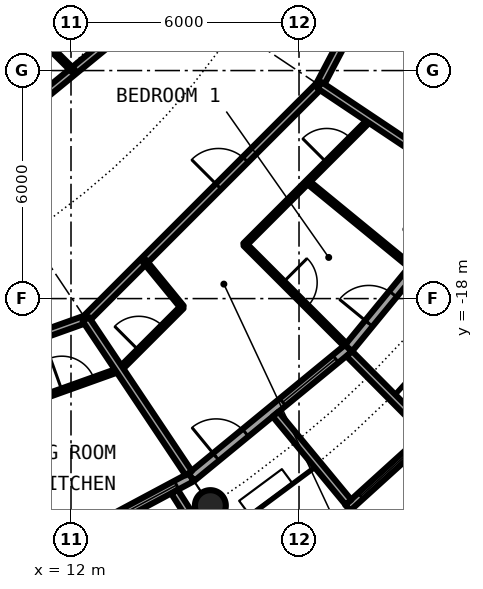
"""IFC4 building model, lengths in metres.
Left out: names, types, materials, properties, quantities, classifications, styles, units other than length and angle.
Written with IfcOpenShell. Run it as: python <this file> out.ifc"""

import sys

from ifc_helpers import new_model, si_unit, direction, frame, frame_2d, origin, origin_2d, place, context, subcontext, project, spatial, rectangle, circle, hollow_circle, extrude, element, fill, save


model = new_model("IFC4")
c1 = context("Model", 3, precision=1e-05, world=origin(), true_north=direction((0.0, 1.0)))
c2 = subcontext(c1, "Body", "Model", "MODEL_VIEW")
j1 = project(units=[si_unit("LENGTHUNIT", "METRE"), si_unit("PLANEANGLEUNIT", "RADIAN")], contexts=[c1])
p1 = place(None, origin())
s1 = spatial("IfcSite", under=j1, at=p1, CompositionType="ELEMENT")
p2 = place(p1, origin())
s2 = spatial("IfcBuilding", under=s1, at=p2, CompositionType="ELEMENT")
p3 = place(p2, frame((0.0, 0.0, 173.8)))
s3 = spatial("IfcBuildingStorey", under=s2, at=p3, CompositionType="ELEMENT", Elevation=173.8)
p4 = place(p3, frame((15.667, -23.448, 0.0), z_axis=(0.0, 0.0, 1.0), x_axis=(1.0, 0.0, 0.0)))
e1 = element("IfcColumn", 1, at=p4, inside=s3, PredefinedType="COLUMN", context=c2, shape_type="SweptSolid", body=[
    extrude(hollow_circle(Radius=0.406, WallThickness=0.04, at=origin_2d()), origin(), (0.0, 0.0, 1.0), 3.05),
])
p5 = place(p3, frame((10.447, -25.222, 0.0), z_axis=(0.0, 0.0, 1.0), x_axis=(0.881915646801, 0.471407246368, 0.0)))
e2 = element("IfcWall", 2, at=p5, inside=s3, PredefinedType="SOLIDWALL", context=c2, shape_type="SweptSolid", body=[
    extrude(rectangle(XDim=5.352, YDim=0.25, at=frame_2d((2.676, 0.0))), origin(), (0.0, 0.0, 1.0), 2.7),
])
p6 = place(p5, frame((0.841, 0.0, 0.0)))
e3 = element("IfcOpeningElement", 3, at=p6, cuts=e2, PredefinedType="OPENING", context=c2, shape_type="SweptSolid", body=[
    extrude(rectangle(XDim=1.0, YDim=2.2, at=frame_2d((0.5, 1.1))), frame((0.0, 0.135, 0.0), z_axis=(0.0, -1.0, 0.0), x_axis=(1.0, 0.0, 0.0)), (0.0, 0.0, 1.0), 0.27),
])
p7 = place(p5, frame((3.111, 0.0, 0.3)))
e4 = element("IfcOpeningElement", 4, at=p7, cuts=e2, PredefinedType="OPENING", context=c2, shape_type="SweptSolid", body=[
    extrude(rectangle(XDim=1.8, YDim=2.1, at=frame_2d((0.9, 1.05))), frame((0.0, 0.135, 0.0), z_axis=(0.0, -1.0, 0.0), x_axis=(1.0, 0.0, 0.0)), (0.0, 0.0, 1.0), 0.27),
])
p8 = place(p3, frame((14.722, -23.079, -0.03), z_axis=(0.0, 0.0, 1.0), x_axis=(0.537572179146, -0.843217737129, 0.0)))
e5 = element("IfcWall", 5, at=p8, inside=s3, PredefinedType="SOLIDWALL", context=c2, shape_type="SweptSolid", body=[
    extrude(rectangle(XDim=2.924, YDim=0.2, at=frame_2d((1.462, 0.0))), origin(), (0.0, 0.0, 1.0), 2.73),
])
p9 = place(p3, frame((15.167, -22.699, 0.0), z_axis=(0.0, 0.0, 1.0), x_axis=(0.773019449054, 0.634382322723, 0.0)))
e6 = element("IfcWall", 6, at=p9, inside=s3, PredefinedType="SOLIDWALL", context=c2, shape_type="SweptSolid", body=[
    extrude(rectangle(XDim=5.352, YDim=0.25, at=frame_2d((2.676, 0.0))), origin(), (0.0, 0.0, 1.0), 2.7),
])
p10 = place(p9, frame((0.841, 0.0, 0.0)))
e7 = element("IfcOpeningElement", 7, at=p10, cuts=e6, PredefinedType="OPENING", context=c2, shape_type="SweptSolid", body=[
    extrude(rectangle(XDim=1.0, YDim=2.2, at=frame_2d((0.5, 1.1))), frame((0.0, 0.135, 0.0), z_axis=(0.0, -1.0, 0.0), x_axis=(1.0, 0.0, 0.0)), (0.0, 0.0, 1.0), 0.27),
])
p11 = place(p9, frame((3.111, 0.0, 0.3)))
e8 = element("IfcOpeningElement", 8, at=p11, cuts=e6, PredefinedType="OPENING", context=c2, shape_type="SweptSolid", body=[
    extrude(rectangle(XDim=1.8, YDim=2.1, at=frame_2d((0.9, 1.05))), frame((0.0, 0.135, 0.0), z_axis=(0.0, -1.0, 0.0), x_axis=(1.0, 0.0, 0.0)), (0.0, 0.0, 1.0), 0.27),
])
p12 = place(p3, frame((19.282, -23.503, -0.03), z_axis=(0.0, 0.0, 1.0), x_axis=(0.740998365753, 0.671506829416, 0.0)))
e9 = element("IfcWall", 9, at=p12, inside=s3, PredefinedType="SOLIDWALL", context=c2, shape_type="SweptSolid", body=[
    extrude(rectangle(XDim=2.993, YDim=0.2, at=frame_2d((1.497, 0.0))), origin(), (0.0, 0.0, 1.0), 2.73),
])
p13 = place(p12, frame((0.457, 0.0, 0.33)))
e10 = element("IfcOpeningElement", 10, at=p13, cuts=e9, PredefinedType="OPENING", context=c2, shape_type="SweptSolid", body=[
    extrude(circle(Radius=1.04, at=frame_2d((1.04, 1.04))), frame((0.0, 0.11, 0.0), z_axis=(0.0, -1.0, 0.0), x_axis=(1.0, 0.0, 0.0)), (0.0, 0.0, 1.0), 0.22),
])
p14 = place(p3, frame((17.384, -21.041, -0.03), z_axis=(0.0, 0.0, 1.0), x_axis=(0.63709551667, -0.770784861449, 0.0)))
e11 = element("IfcWall", 11, at=p14, inside=s3, PredefinedType="SOLIDWALL", context=c2, shape_type="SweptSolid", body=[
    extrude(rectangle(XDim=3.006, YDim=0.2, at=frame_2d((1.503, 0.0))), origin(), (0.0, 0.0, 1.0), 2.73),
])
p15 = place(p3, frame((19.323, -19.45, -0.03), z_axis=(0.0, 0.0, 1.0), x_axis=(0.704476739375, -0.709727076896, 0.0)))
e12 = element("IfcWall", 12, at=p15, inside=s3, PredefinedType="SOLIDWALL", context=c2, shape_type="SweptSolid", body=[
    extrude(rectangle(XDim=2.883, YDim=0.2, at=frame_2d((1.441, 0.0))), origin(), (0.0, 0.0, 1.0), 2.73),
])
p16 = place(p3, frame((19.304, -19.304, 0.0), z_axis=(0.0, 0.0, 1.0), x_axis=(0.634382322723, 0.773019449054, 0.0)))
e13 = element("IfcWall", 13, at=p16, inside=s3, PredefinedType="SOLIDWALL", context=c2, shape_type="SweptSolid", body=[
    extrude(rectangle(XDim=5.352, YDim=0.25, at=frame_2d((2.676, 0.0))), origin(), (0.0, 0.0, 1.0), 2.7),
])
p17 = place(p16, frame((0.841, 0.0, 0.0)))
e14 = element("IfcOpeningElement", 14, at=p17, cuts=e13, PredefinedType="OPENING", context=c2, shape_type="SweptSolid", body=[
    extrude(rectangle(XDim=1.0, YDim=2.2, at=frame_2d((0.5, 1.1))), frame((0.0, 0.135, 0.0), z_axis=(0.0, -1.0, 0.0), x_axis=(1.0, 0.0, 0.0)), (0.0, 0.0, 1.0), 0.27),
])
p18 = place(p16, frame((3.111, 0.0, 0.3)))
e15 = element("IfcOpeningElement", 15, at=p18, cuts=e13, PredefinedType="OPENING", context=c2, shape_type="SweptSolid", body=[
    extrude(rectangle(XDim=1.8, YDim=2.1, at=frame_2d((0.9, 1.05))), frame((0.0, 0.135, 0.0), z_axis=(0.0, -1.0, 0.0), x_axis=(1.0, 0.0, 0.0)), (0.0, 0.0, 1.0), 0.27),
])
p19 = place(p3, frame((13.278, -19.872, 0.0), z_axis=(0.0, 0.0, 1.0), x_axis=(0.707316201218, 0.706897299114, 0.0)))
e16 = element("IfcWall", 16, at=p19, inside=s3, PredefinedType="PARTITIONING", context=c2, shape_type="SweptSolid", body=[
    extrude(rectangle(XDim=2.331, YDim=0.1, at=frame_2d((1.166, 0.0))), origin(), (0.0, 0.0, 1.0), 2.7),
])
p20 = place(p19, frame((0.716, 0.0, 0.0)))
e17 = element("IfcOpeningElement", 17, at=p20, cuts=e16, PredefinedType="OPENING", context=c2, shape_type="SweptSolid", body=[
    extrude(rectangle(XDim=0.9, YDim=2.3, at=frame_2d((0.45, 1.15))), frame((0.0, 0.06, 0.0), z_axis=(0.0, -1.0, 0.0), x_axis=(1.0, 0.0, 0.0)), (0.0, 0.0, 1.0), 0.12),
])
p21 = place(p3, frame((16.569, -16.583, 0.0), z_axis=(0.0, 0.0, 1.0), x_axis=(0.707316201218, 0.706897299114, 0.0)))
e18 = element("IfcWall", 18, at=p21, inside=s3, PredefinedType="PARTITIONING", context=c2, shape_type="SweptSolid", body=[
    extrude(rectangle(XDim=4.663, YDim=0.1, at=frame_2d((2.331, 0.0))), origin(), (0.0, 0.0, 1.0), 2.7),
])
p22 = place(p21, frame((3.055, 0.0, 0.0)))
e19 = element("IfcOpeningElement", 19, at=p22, cuts=e18, PredefinedType="OPENING", context=c2, shape_type="SweptSolid", body=[
    extrude(rectangle(XDim=0.9, YDim=2.3, at=frame_2d((0.45, 1.15))), frame((0.0, 0.06, 0.0), z_axis=(0.0, -1.0, 0.0), x_axis=(1.0, 0.0, 0.0)), (0.0, 0.0, 1.0), 0.12),
])
p23 = place(p3, frame((11.091, -20.655, 0.0), z_axis=(0.0, 0.0, 1.0), x_axis=(0.941484831917, 0.337055353422, 0.0)))
e20 = element("IfcWall", 20, at=p23, inside=s3, PredefinedType="PARTITIONING", context=c2, shape_type="SweptSolid", body=[
    extrude(rectangle(XDim=2.323, YDim=0.1, at=frame_2d((1.162, 0.0))), origin(), (0.0, 0.0, 1.0), 2.7),
])
p24 = place(p23, frame((0.711, 0.0, 0.0)))
e21 = element("IfcOpeningElement", 21, at=p24, cuts=e20, PredefinedType="OPENING", context=c2, shape_type="SweptSolid", body=[
    extrude(rectangle(XDim=0.9, YDim=2.3, at=frame_2d((0.45, 1.15))), frame((0.0, 0.06, 0.0), z_axis=(0.0, -1.0, 0.0), x_axis=(1.0, 0.0, 0.0)), (0.0, 0.0, 1.0), 0.12),
])
p25 = place(p3, frame((18.542, -12.389, 0.0), z_axis=(0.0, 0.0, 1.0), x_axis=(0.465605550524, 0.884992356646, 0.0)))
e22 = element("IfcWall", 22, at=p25, inside=s3, PredefinedType="PARTITIONING", context=c2, shape_type="SweptSolid", body=[
    extrude(rectangle(XDim=1.643, YDim=0.2, at=frame_2d((0.821, 0.0))), origin(), (0.0, 0.0, 1.0), 2.7),
])
p26 = place(p3, frame((12.389, -18.542, 0.0), z_axis=(0.0, 0.0, 1.0), x_axis=(0.707106781187, 0.707106781187, 0.0)))
e23 = element("IfcWall", 23, at=p26, inside=s3, PredefinedType="PARTITIONING", context=c2, shape_type="SweptSolid", body=[
    extrude(rectangle(XDim=8.702, YDim=0.2, at=frame_2d((4.351, 0.0))), origin(), (0.0, 0.0, 1.0), 2.7),
])
p27 = place(p26, frame((4.938, 0.0, 0.0)))
e24 = element("IfcOpeningElement", 24, at=p27, cuts=e23, PredefinedType="OPENING", context=c2, shape_type="SweptSolid", body=[
    extrude(rectangle(XDim=1.0, YDim=2.3, at=frame_2d((0.5, 1.15))), frame((0.0, 0.11, 0.0), z_axis=(0.0, -1.0, 0.0), x_axis=(1.0, 0.0, 0.0)), (0.0, 0.0, 1.0), 0.22),
])
p28 = place(p3, frame((2.186, -22.193, 0.0), z_axis=(0.0, 0.0, 1.0), x_axis=(0.941530192736, 0.336928621769, 0.0)))
e25 = element("IfcWall", 25, at=p28, inside=s3, PredefinedType="PARTITIONING", context=c2, shape_type="SweptSolid", body=[
    extrude(rectangle(XDim=10.836, YDim=0.2, at=frame_2d((5.418, 0.0))), origin(), (0.0, 0.0, 1.0), 2.7),
])
p29 = place(p28, frame((3.835, 0.0, 0.0)))
e26 = element("IfcOpeningElement", 26, at=p29, cuts=e25, PredefinedType="OPENING", context=c2, shape_type="SweptSolid", body=[
    extrude(rectangle(XDim=1.0, YDim=2.3, at=frame_2d((0.5, 1.15))), frame((0.0, 0.11, 0.0), z_axis=(0.0, -1.0, 0.0), x_axis=(1.0, 0.0, 0.0)), (0.0, 0.0, 1.0), 0.22),
])
p30 = place(p3, frame((6.773, -16.353, 0.0), z_axis=(0.0, 0.0, 1.0), x_axis=(0.773034536097, 0.634363938131, 0.0)))
e27 = element("IfcWall", 27, at=p30, inside=s3, PredefinedType="PARTITIONING", context=c2, shape_type="SweptSolid", body=[
    extrude(rectangle(XDim=10.277, YDim=0.2, at=frame_2d((5.138, 0.0))), origin(), (0.0, 0.0, 1.0), 2.7),
])
p31 = place(p30, frame((4.638, 0.0, 0.0)))
e28 = element("IfcOpeningElement", 28, at=p31, cuts=e27, PredefinedType="OPENING", context=c2, shape_type="SweptSolid", body=[
    extrude(rectangle(XDim=1.0, YDim=2.3, at=frame_2d((0.5, 1.15))), frame((0.0, 0.11, 0.0), z_axis=(0.0, -1.0, 0.0), x_axis=(1.0, 0.0, 0.0)), (0.0, 0.0, 1.0), 0.22),
])
p32 = place(p3, frame((13.927, -17.004, 0.0), z_axis=(0.0, 0.0, 1.0), x_axis=(0.633861186344, -0.773446828454, 0.0)))
e29 = element("IfcWall", 29, at=p32, inside=s3, PredefinedType="PARTITIONING", context=c2, shape_type="SweptSolid", body=[
    extrude(rectangle(XDim=1.578, YDim=0.1, at=frame_2d((0.789, 0.0))), origin(), (0.0, 0.0, 1.0), 2.7),
])
p33 = place(p3, frame((9.144, -9.104, 0.0), z_axis=(0.0, 0.0, 1.0), x_axis=(0.708793214553, -0.705416316088, 0.0)))
e30 = element("IfcWall", 30, at=p33, inside=s3, PredefinedType="PARTITIONING", context=c2, shape_type="SweptSolid", body=[
    extrude(rectangle(XDim=4.121, YDim=0.1, at=frame_2d((2.061, 0.0))), origin(), (0.0, 0.0, 1.0), 2.7),
])
p34 = place(p33, frame((1.611, 0.0, 0.0)))
e31 = element("IfcOpeningElement", 31, at=p34, cuts=e30, PredefinedType="OPENING", context=c2, shape_type="SweptSolid", body=[
    extrude(rectangle(XDim=0.9, YDim=2.3, at=frame_2d((0.45, 1.15))), frame((0.0, 0.06, 0.0), z_axis=(0.0, -1.0, 0.0), x_axis=(1.0, 0.0, 0.0)), (0.0, 0.0, 1.0), 0.12),
])
p35 = place(p3, frame((12.389, -18.542, 0.0), z_axis=(0.0, 0.0, 1.0), x_axis=(0.55569370664, -0.831387096605, 0.0)))
e32 = element("IfcWall", 32, at=p35, inside=s3, PredefinedType="PARTITIONING", context=c2, shape_type="SweptSolid", body=[
    extrude(rectangle(XDim=4.875, YDim=0.2, at=frame_2d((2.438, 0.0))), origin(), (0.0, 0.0, 1.0), 2.7),
])
p36 = place(p3, frame((16.575, -16.575, 0.0), z_axis=(0.0, 0.0, 1.0), x_axis=(0.707106781187, -0.707106781187, 0.0)))
e33 = element("IfcWall", 33, at=p36, inside=s3, PredefinedType="PARTITIONING", context=c2, shape_type="SweptSolid", body=[
    extrude(rectangle(XDim=3.735, YDim=0.1, at=frame_2d((1.868, 0.0))), origin(), (0.0, 0.0, 1.0), 2.7),
])
p37 = place(p36, frame((1.418, 0.0, 0.0)))
e34 = element("IfcOpeningElement", 34, at=p37, cuts=e33, PredefinedType="OPENING", context=c2, shape_type="SweptSolid", body=[
    extrude(rectangle(XDim=0.9, YDim=2.3, at=frame_2d((0.45, 1.15))), frame((0.0, 0.06, 0.0), z_axis=(0.0, -1.0, 0.0), x_axis=(1.0, 0.0, 0.0)), (0.0, 0.0, 1.0), 0.12),
])
p38 = place(p3, frame((18.224, -14.927, 0.0), z_axis=(0.0, 0.0, 1.0), x_axis=(0.773548271597, -0.633737383709, 0.0)))
e35 = element("IfcWall", 35, at=p38, inside=s3, PredefinedType="PARTITIONING", context=c2, shape_type="SweptSolid", body=[
    extrude(rectangle(XDim=3.618, YDim=0.1, at=frame_2d((1.809, 0.0))), origin(), (0.0, 0.0, 1.0), 2.7),
])
p39 = place(p3, frame((18.542, -12.389, 0.0), z_axis=(0.0, 0.0, 1.0), x_axis=(0.831387096605, -0.55569370664, 0.0)))
e36 = element("IfcWall", 36, at=p39, inside=s3, PredefinedType="PARTITIONING", context=c2, shape_type="SweptSolid", body=[
    extrude(rectangle(XDim=4.875, YDim=0.2, at=frame_2d((2.438, 0.0))), origin(), (0.0, 0.0, 1.0), 2.7),
])
p40 = place(p7, origin())
e37 = element("IfcWindow", 37, at=p40, inside=s3, PartitioningType="SINGLE_PANEL", PredefinedType="WINDOW", context=c2, shape_type="SweptSolid", body=[
    extrude(rectangle(XDim=1.8, YDim=2.1, at=frame_2d((0.9, 1.05))), frame((0.0, 0.03, 0.0), z_axis=(0.0, -1.0, 0.0), x_axis=(1.0, 0.0, 0.0)), (0.0, 0.0, 1.0), 0.06),
])
fill(e4, e37)
p41 = place(p10, origin())
e38 = element("IfcDoor", 38, at=p41, inside=s3, OperationType="SINGLE_SWING_LEFT", PredefinedType="DOOR", context=c2, shape_type="SweptSolid", body=[
    extrude(rectangle(XDim=1.0, YDim=2.2, at=frame_2d((0.5, 1.1))), frame((0.0, 0.025, 0.0), z_axis=(0.0, -1.0, 0.0), x_axis=(1.0, 0.0, 0.0)), (0.0, 0.0, 1.0), 0.05),
])
fill(e7, e38)
p42 = place(p11, origin())
e39 = element("IfcWindow", 39, at=p42, inside=s3, PartitioningType="SINGLE_PANEL", PredefinedType="WINDOW", context=c2, shape_type="SweptSolid", body=[
    extrude(rectangle(XDim=1.8, YDim=2.1, at=frame_2d((0.9, 1.05))), frame((0.0, 0.03, 0.0), z_axis=(0.0, -1.0, 0.0), x_axis=(1.0, 0.0, 0.0)), (0.0, 0.0, 1.0), 0.06),
])
fill(e8, e39)
p43 = place(p13, origin())
e40 = element("IfcWindow", 40, at=p43, inside=s3, PartitioningType="SINGLE_PANEL", PredefinedType="WINDOW", context=c2, shape_type="SweptSolid", body=[
    extrude(circle(Radius=1.04, at=frame_2d((1.04, 1.04))), frame((0.0, 0.03, 0.0), z_axis=(0.0, -1.0, 0.0), x_axis=(1.0, 0.0, 0.0)), (0.0, 0.0, 1.0), 0.06),
])
fill(e10, e40)
p44 = place(p17, origin())
e41 = element("IfcDoor", 41, at=p44, inside=s3, OperationType="SINGLE_SWING_LEFT", PredefinedType="DOOR", context=c2, shape_type="SweptSolid", body=[
    extrude(rectangle(XDim=1.0, YDim=2.2, at=frame_2d((0.5, 1.1))), frame((0.0, 0.025, 0.0), z_axis=(0.0, -1.0, 0.0), x_axis=(1.0, 0.0, 0.0)), (0.0, 0.0, 1.0), 0.05),
])
fill(e14, e41)
p45 = place(p24, origin())
e42 = element("IfcDoor", 42, at=p45, inside=s3, OperationType="SINGLE_SWING_RIGHT", PredefinedType="DOOR", context=c2, shape_type="SweptSolid", body=[
    extrude(rectangle(XDim=0.9, YDim=2.3, at=frame_2d((0.45, 1.15))), frame((0.0, 0.025, 0.0), z_axis=(0.0, -1.0, 0.0), x_axis=(1.0, 0.0, 0.0)), (0.0, 0.0, 1.0), 0.05),
])
fill(e21, e42)
p46 = place(p27, origin())
e43 = element("IfcDoor", 43, at=p46, inside=s3, OperationType="SINGLE_SWING_RIGHT", PredefinedType="DOOR", context=c2, shape_type="SweptSolid", body=[
    extrude(rectangle(XDim=1.0, YDim=2.3, at=frame_2d((0.5, 1.15))), frame((0.0, 0.025, 0.0), z_axis=(0.0, -1.0, 0.0), x_axis=(1.0, 0.0, 0.0)), (0.0, 0.0, 1.0), 0.05),
])
fill(e24, e43)
p47 = place(p20, origin())
e44 = element("IfcDoor", 44, at=p47, inside=s3, OperationType="SINGLE_SWING_RIGHT", PredefinedType="DOOR", context=c2, shape_type="SweptSolid", body=[
    extrude(rectangle(XDim=0.9, YDim=2.3, at=frame_2d((0.45, 1.15))), frame((0.0, 0.025, 0.0), z_axis=(0.0, -1.0, 0.0), x_axis=(1.0, 0.0, 0.0)), (0.0, 0.0, 1.0), 0.05),
])
fill(e17, e44)
p48 = place(p37, origin())
e45 = element("IfcDoor", 45, at=p48, inside=s3, OperationType="SINGLE_SWING_RIGHT", PredefinedType="DOOR", context=c2, shape_type="SweptSolid", body=[
    extrude(rectangle(XDim=0.9, YDim=2.3, at=frame_2d((0.45, 1.15))), frame((0.0, 0.025, 0.0), z_axis=(0.0, -1.0, 0.0), x_axis=(1.0, 0.0, 0.0)), (0.0, 0.0, 1.0), 0.05),
])
fill(e34, e45)
p49 = place(p22, origin())
e46 = element("IfcDoor", 46, at=p49, inside=s3, OperationType="SINGLE_SWING_RIGHT", PredefinedType="DOOR", context=c2, shape_type="SweptSolid", body=[
    extrude(rectangle(XDim=0.9, YDim=2.3, at=frame_2d((0.45, 1.15))), frame((0.0, 0.025, 0.0), z_axis=(0.0, -1.0, 0.0), x_axis=(1.0, 0.0, 0.0)), (0.0, 0.0, 1.0), 0.05),
])
fill(e19, e46)
save(model, sys.argv[1])
